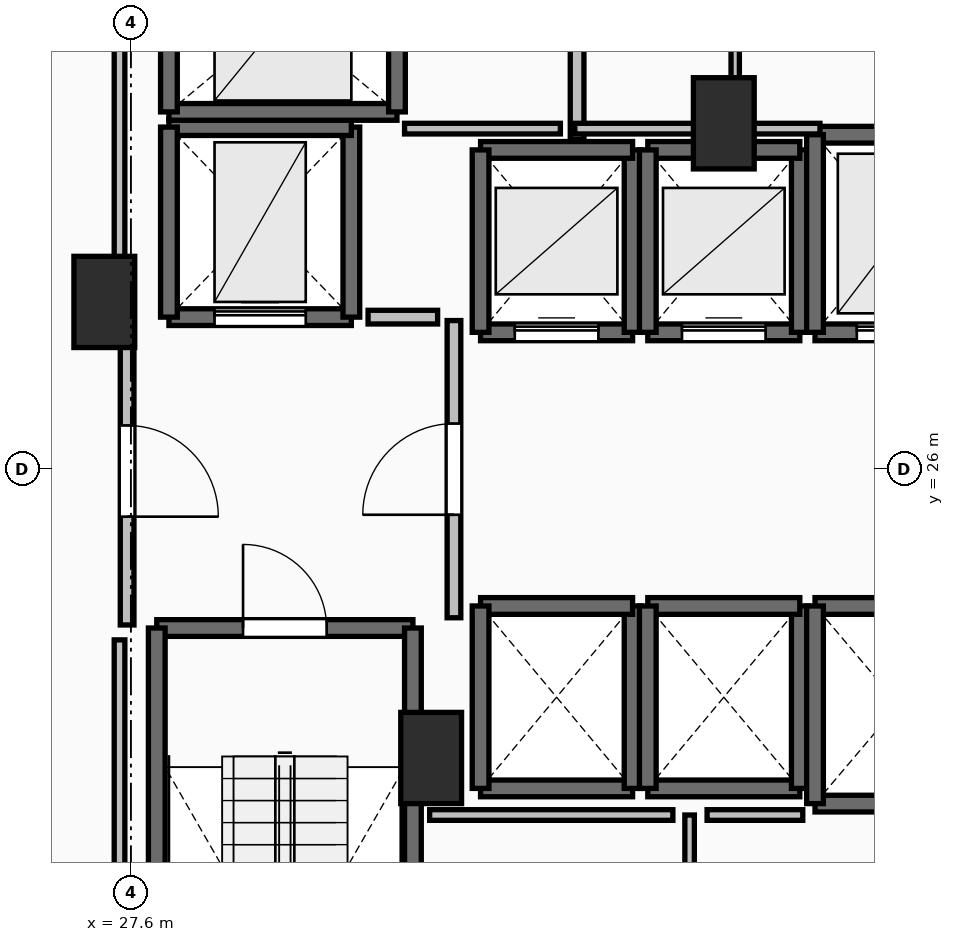
"""IFC4 building model, lengths in metres.
Left out: names, types, materials, properties, quantities, classifications, styles, units other than length and angle.
Written with IfcOpenShell. Run it as: python <this file> out.ifc"""

import sys

from ifc_helpers import new_model, si_unit, direction, frame, frame_2d, origin, origin_2d, place, context, subcontext, project, spatial, rectangle, extrude, element, fill, save


model = new_model("IFC4")
c1 = context("Model", 3, precision=1e-05, world=origin(), true_north=direction((0.0, 1.0)))
c2 = subcontext(c1, "Body", "Model", "MODEL_VIEW")
j1 = project(units=[si_unit("LENGTHUNIT", "METRE"), si_unit("PLANEANGLEUNIT", "RADIAN")], contexts=[c1])
p1 = place(None, origin())
s1 = spatial("IfcSite", under=j1, at=p1, CompositionType="ELEMENT")
p2 = place(p1, origin())
s2 = spatial("IfcBuilding", under=s1, at=p2, CompositionType="ELEMENT")
p3 = place(p2, frame((0.0, 0.0, 74.3)))
s3 = spatial("IfcBuildingStorey", under=s2, at=p3, CompositionType="ELEMENT", Elevation=74.3)
for number, where, z_axis, x_axis in (
    (1, (27.25, 28.2, 0.0), (0.0, 0.0, 1.0), (1.0, 0.0, 0.0)),
    (2, (31.55, 22.2, 0.0), (0.0, 0.0, 1.0), (1.0, 0.0, 0.0)),
    (3, (35.4, 30.55, 0.0), (0.0, 0.0, 1.0), (1.0, 0.0, 0.0)),
):
    element("IfcColumn", number, at=place(p3, frame(where, z_axis=z_axis, x_axis=x_axis)), inside=s3, PredefinedType="PILASTER", context=c2, shape_type="SweptSolid", body=[
        extrude(rectangle(XDim=0.8, YDim=1.2, at=origin_2d()), origin(), (0.0, 0.0, 1.0), 4.5),
    ])
p4 = place(p3, frame((27.94, 23.91, 0.0), z_axis=(0.0, 0.0, 1.0), x_axis=(1.0, 0.0, 0.0)))
e4 = element("IfcWall", 4, at=p4, inside=s3, PredefinedType="SOLIDWALL", context=c2, shape_type="SweptSolid", body=[
    extrude(rectangle(XDim=3.37, YDim=0.22, at=frame_2d((1.685, 0.0))), origin(), (0.0, 0.0, 1.0), 4.24),
])
p5 = place(p4, frame((1.135, 0.0, 0.0)))
e5 = element("IfcOpeningElement", 5, at=p5, cuts=e4, PredefinedType="OPENING", context=c2, shape_type="SweptSolid", body=[
    extrude(rectangle(XDim=1.1, YDim=2.15, at=frame_2d((0.55, 1.075))), frame((0.0, 0.125, 0.0), z_axis=(0.0, -1.0, 0.0), x_axis=(1.0, 0.0, 0.0)), (0.0, 0.0, 1.0), 0.25),
])
for number, where, z_axis, x_axis in (
    (6, (31.31, 23.91, 0.0), (0.0, 0.0, 1.0), (0.0, -1.0, 0.0)),
    (7, (27.94, 16.49, 0.0), (0.0, 0.0, 1.0), (0.0, 1.0, 0.0)),
):
    element("IfcWall", number, at=place(p3, frame(where, z_axis=z_axis, x_axis=x_axis)), inside=s3, PredefinedType="SOLIDWALL", context=c2, shape_type="SweptSolid", body=[
        extrude(rectangle(XDim=7.42, YDim=0.22, at=frame_2d((3.71, 0.0))), origin(), (0.0, 0.0, 1.0), 4.24),
    ])
p6 = place(p3, frame((32.2, 27.8, 0.0), z_axis=(0.0, 0.0, 1.0), x_axis=(1.0, 0.0, 0.0)))
e8 = element("IfcWall", 8, at=p6, inside=s3, PredefinedType="SOLIDWALL", context=c2, shape_type="SweptSolid", body=[
    extrude(rectangle(XDim=2.0, YDim=0.22, at=frame_2d((1.0, 0.0))), origin(), (0.0, 0.0, 1.0), 4.24),
])
p7 = place(p6, frame((0.45, 0.0, 0.0)))
e9 = element("IfcOpeningElement", 9, at=p7, cuts=e8, PredefinedType="OPENING", context=c2, shape_type="SweptSolid", body=[
    extrude(rectangle(XDim=1.1, YDim=2.2, at=frame_2d((0.55, 1.1))), frame((0.0, 0.125, 0.0), z_axis=(0.0, -1.0, 0.0), x_axis=(1.0, 0.0, 0.0)), (0.0, 0.0, 1.0), 0.25),
])
p8 = place(p3, frame((34.2, 27.8, 0.0), z_axis=(0.0, 0.0, 1.0), x_axis=(0.0, 1.0, 0.0)))
e10 = element("IfcWall", 10, at=p8, inside=s3, PredefinedType="SOLIDWALL", context=c2, shape_type="SweptSolid", body=[
    extrude(rectangle(XDim=2.4, YDim=0.22, at=frame_2d((1.2, 0.0))), origin(), (0.0, 0.0, 1.0), 4.24),
])
p9 = place(p3, frame((34.2, 30.2, 0.0), z_axis=(0.0, 0.0, 1.0), x_axis=(-1.0, 0.0, 0.0)))
e11 = element("IfcWall", 11, at=p9, inside=s3, PredefinedType="SOLIDWALL", context=c2, shape_type="SweptSolid", body=[
    extrude(rectangle(XDim=2.0, YDim=0.22, at=frame_2d((1.0, 0.0))), origin(), (0.0, 0.0, 1.0), 4.24),
])
p10 = place(p3, frame((32.2, 30.2, 0.0), z_axis=(0.0, 0.0, 1.0), x_axis=(0.0, -1.0, 0.0)))
e12 = element("IfcWall", 12, at=p10, inside=s3, PredefinedType="SOLIDWALL", context=c2, shape_type="SweptSolid", body=[
    extrude(rectangle(XDim=2.4, YDim=0.22, at=frame_2d((1.2, 0.0))), origin(), (0.0, 0.0, 1.0), 4.24),
])
p11 = place(p3, frame((34.4, 27.8, 0.0), z_axis=(0.0, 0.0, 1.0), x_axis=(1.0, 0.0, 0.0)))
e13 = element("IfcWall", 13, at=p11, inside=s3, PredefinedType="SOLIDWALL", context=c2, shape_type="SweptSolid", body=[
    extrude(rectangle(XDim=2.0, YDim=0.22, at=frame_2d((1.0, 0.0))), origin(), (0.0, 0.0, 1.0), 4.24),
])
p12 = place(p11, frame((0.45, 0.0, 0.0)))
e14 = element("IfcOpeningElement", 14, at=p12, cuts=e13, PredefinedType="OPENING", context=c2, shape_type="SweptSolid", body=[
    extrude(rectangle(XDim=1.1, YDim=2.2, at=frame_2d((0.55, 1.1))), frame((0.0, 0.125, 0.0), z_axis=(0.0, -1.0, 0.0), x_axis=(1.0, 0.0, 0.0)), (0.0, 0.0, 1.0), 0.25),
])
p13 = place(p3, frame((36.4, 27.8, 0.0), z_axis=(0.0, 0.0, 1.0), x_axis=(0.0, 1.0, 0.0)))
e15 = element("IfcWall", 15, at=p13, inside=s3, PredefinedType="SOLIDWALL", context=c2, shape_type="SweptSolid", body=[
    extrude(rectangle(XDim=2.4, YDim=0.22, at=frame_2d((1.2, 0.0))), origin(), (0.0, 0.0, 1.0), 4.24),
])
p14 = place(p3, frame((36.4, 30.2, 0.0), z_axis=(0.0, 0.0, 1.0), x_axis=(-1.0, 0.0, 0.0)))
e16 = element("IfcWall", 16, at=p14, inside=s3, PredefinedType="SOLIDWALL", context=c2, shape_type="SweptSolid", body=[
    extrude(rectangle(XDim=2.0, YDim=0.22, at=frame_2d((1.0, 0.0))), origin(), (0.0, 0.0, 1.0), 4.24),
])
p15 = place(p3, frame((34.4, 30.2, 0.0), z_axis=(0.0, 0.0, 1.0), x_axis=(0.0, -1.0, 0.0)))
e17 = element("IfcWall", 17, at=p15, inside=s3, PredefinedType="SOLIDWALL", context=c2, shape_type="SweptSolid", body=[
    extrude(rectangle(XDim=2.4, YDim=0.22, at=frame_2d((1.2, 0.0))), origin(), (0.0, 0.0, 1.0), 4.24),
])
p16 = place(p3, frame((36.6, 27.8, 0.0), z_axis=(0.0, 0.0, 1.0), x_axis=(1.0, 0.0, 0.0)))
e18 = element("IfcWall", 18, at=p16, inside=s3, PredefinedType="SOLIDWALL", context=c2, shape_type="SweptSolid", body=[
    extrude(rectangle(XDim=2.2, YDim=0.22, at=frame_2d((1.1, 0.0))), origin(), (0.0, 0.0, 1.0), 4.24),
])
p17 = place(p16, frame((0.55, 0.0, 0.0)))
e19 = element("IfcOpeningElement", 19, at=p17, cuts=e18, PredefinedType="OPENING", context=c2, shape_type="SweptSolid", body=[
    extrude(rectangle(XDim=1.1, YDim=2.2, at=frame_2d((0.55, 1.1))), frame((0.0, 0.125, 0.0), z_axis=(0.0, -1.0, 0.0), x_axis=(1.0, 0.0, 0.0)), (0.0, 0.0, 1.0), 0.25),
])
p18 = place(p3, frame((38.8, 30.4, 0.0), z_axis=(0.0, 0.0, 1.0), x_axis=(-1.0, 0.0, 0.0)))
e20 = element("IfcWall", 20, at=p18, inside=s3, PredefinedType="SOLIDWALL", context=c2, shape_type="SweptSolid", body=[
    extrude(rectangle(XDim=2.2, YDim=0.22, at=frame_2d((1.1, 0.0))), origin(), (0.0, 0.0, 1.0), 4.24),
])
p19 = place(p3, frame((36.6, 30.4, 0.0), z_axis=(0.0, 0.0, 1.0), x_axis=(0.0, -1.0, 0.0)))
e21 = element("IfcWall", 21, at=p19, inside=s3, PredefinedType="SOLIDWALL", context=c2, shape_type="SweptSolid", body=[
    extrude(rectangle(XDim=2.6, YDim=0.22, at=frame_2d((1.3, 0.0))), origin(), (0.0, 0.0, 1.0), 4.24),
])
p20 = place(p3, frame((32.2, 21.8, 0.0), z_axis=(0.0, 0.0, 1.0), x_axis=(1.0, 0.0, 0.0)))
e22 = element("IfcWall", 22, at=p20, inside=s3, PredefinedType="SOLIDWALL", context=c2, shape_type="SweptSolid", body=[
    extrude(rectangle(XDim=2.0, YDim=0.22, at=frame_2d((1.0, 0.0))), origin(), (0.0, 0.0, 1.0), 4.24),
])
p21 = place(p3, frame((34.2, 21.8, 0.0), z_axis=(0.0, 0.0, 1.0), x_axis=(0.0, 1.0, 0.0)))
e23 = element("IfcWall", 23, at=p21, inside=s3, PredefinedType="SOLIDWALL", context=c2, shape_type="SweptSolid", body=[
    extrude(rectangle(XDim=2.4, YDim=0.22, at=frame_2d((1.2, 0.0))), origin(), (0.0, 0.0, 1.0), 4.24),
])
p22 = place(p3, frame((34.2, 24.2, 0.0), z_axis=(0.0, 0.0, 1.0), x_axis=(-1.0, 0.0, 0.0)))
e24 = element("IfcWall", 24, at=p22, inside=s3, PredefinedType="SOLIDWALL", context=c2, shape_type="SweptSolid", body=[
    extrude(rectangle(XDim=2.0, YDim=0.22, at=frame_2d((1.0, 0.0))), origin(), (0.0, 0.0, 1.0), 4.24),
])
p23 = place(p3, frame((32.2, 24.2, 0.0), z_axis=(0.0, 0.0, 1.0), x_axis=(0.0, -1.0, 0.0)))
e25 = element("IfcWall", 25, at=p23, inside=s3, PredefinedType="SOLIDWALL", context=c2, shape_type="SweptSolid", body=[
    extrude(rectangle(XDim=2.4, YDim=0.22, at=frame_2d((1.2, 0.0))), origin(), (0.0, 0.0, 1.0), 4.24),
])
p24 = place(p3, frame((34.4, 21.8, 0.0), z_axis=(0.0, 0.0, 1.0), x_axis=(1.0, 0.0, 0.0)))
e26 = element("IfcWall", 26, at=p24, inside=s3, PredefinedType="SOLIDWALL", context=c2, shape_type="SweptSolid", body=[
    extrude(rectangle(XDim=2.0, YDim=0.22, at=frame_2d((1.0, 0.0))), origin(), (0.0, 0.0, 1.0), 4.24),
])
p25 = place(p3, frame((36.4, 21.8, 0.0), z_axis=(0.0, 0.0, 1.0), x_axis=(0.0, 1.0, 0.0)))
e27 = element("IfcWall", 27, at=p25, inside=s3, PredefinedType="SOLIDWALL", context=c2, shape_type="SweptSolid", body=[
    extrude(rectangle(XDim=2.4, YDim=0.22, at=frame_2d((1.2, 0.0))), origin(), (0.0, 0.0, 1.0), 4.24),
])
p26 = place(p3, frame((36.4, 24.2, 0.0), z_axis=(0.0, 0.0, 1.0), x_axis=(-1.0, 0.0, 0.0)))
e28 = element("IfcWall", 28, at=p26, inside=s3, PredefinedType="SOLIDWALL", context=c2, shape_type="SweptSolid", body=[
    extrude(rectangle(XDim=2.0, YDim=0.22, at=frame_2d((1.0, 0.0))), origin(), (0.0, 0.0, 1.0), 4.24),
])
p27 = place(p3, frame((34.4, 24.2, 0.0), z_axis=(0.0, 0.0, 1.0), x_axis=(0.0, -1.0, 0.0)))
e29 = element("IfcWall", 29, at=p27, inside=s3, PredefinedType="SOLIDWALL", context=c2, shape_type="SweptSolid", body=[
    extrude(rectangle(XDim=2.4, YDim=0.22, at=frame_2d((1.2, 0.0))), origin(), (0.0, 0.0, 1.0), 4.24),
])
for number, where, z_axis, x_axis in (
    (30, (36.6, 21.6, 0.0), (0.0, 0.0, 1.0), (1.0, 0.0, 0.0)),
    (31, (38.8, 24.2, 0.0), (0.0, 0.0, 1.0), (-1.0, 0.0, 0.0)),
):
    element("IfcWall", number, at=place(p3, frame(where, z_axis=z_axis, x_axis=x_axis)), inside=s3, PredefinedType="SOLIDWALL", context=c2, shape_type="SweptSolid", body=[
        extrude(rectangle(XDim=2.2, YDim=0.22, at=frame_2d((1.1, 0.0))), origin(), (0.0, 0.0, 1.0), 4.24),
    ])
p28 = place(p3, frame((36.6, 24.2, 0.0), z_axis=(0.0, 0.0, 1.0), x_axis=(0.0, -1.0, 0.0)))
e32 = element("IfcWall", 32, at=p28, inside=s3, PredefinedType="SOLIDWALL", context=c2, shape_type="SweptSolid", body=[
    extrude(rectangle(XDim=2.6, YDim=0.22, at=frame_2d((1.3, 0.0))), origin(), (0.0, 0.0, 1.0), 4.24),
])
p29 = place(p3, frame((28.1, 28.0, 0.0), z_axis=(0.0, 0.0, 1.0), x_axis=(1.0, 0.0, 0.0)))
e33 = element("IfcWall", 33, at=p29, inside=s3, PredefinedType="SHEAR", context=c2, shape_type="SweptSolid", body=[
    extrude(rectangle(XDim=2.4, YDim=0.22, at=frame_2d((1.2, 0.0))), origin(), (0.0, 0.0, 1.0), 4.24),
])
p30 = place(p29, frame((0.6, 0.0, 0.0)))
e34 = element("IfcOpeningElement", 34, at=p30, cuts=e33, PredefinedType="OPENING", context=c2, shape_type="SweptSolid", body=[
    extrude(rectangle(XDim=1.2, YDim=2.2, at=frame_2d((0.6, 1.1))), frame((0.0, 0.125, 0.0), z_axis=(0.0, -1.0, 0.0), x_axis=(1.0, 0.0, 0.0)), (0.0, 0.0, 1.0), 0.25),
])
p31 = place(p3, frame((30.5, 28.0, 0.0), z_axis=(0.0, 0.0, 1.0), x_axis=(0.0, 1.0, 0.0)))
e35 = element("IfcWall", 35, at=p31, inside=s3, PredefinedType="SHEAR", context=c2, shape_type="SweptSolid", body=[
    extrude(rectangle(XDim=2.5, YDim=0.22, at=frame_2d((1.25, 0.0))), origin(), (0.0, 0.0, 1.0), 4.24),
])
p32 = place(p3, frame((30.5, 30.5, 0.0), z_axis=(0.0, 0.0, 1.0), x_axis=(-1.0, 0.0, 0.0)))
e36 = element("IfcWall", 36, at=p32, inside=s3, PredefinedType="SHEAR", context=c2, shape_type="SweptSolid", body=[
    extrude(rectangle(XDim=2.4, YDim=0.22, at=frame_2d((1.2, 0.0))), origin(), (0.0, 0.0, 1.0), 4.24),
])
p33 = place(p3, frame((28.1, 30.5, 0.0), z_axis=(0.0, 0.0, 1.0), x_axis=(0.0, -1.0, 0.0)))
e37 = element("IfcWall", 37, at=p33, inside=s3, PredefinedType="SHEAR", context=c2, shape_type="SweptSolid", body=[
    extrude(rectangle(XDim=2.5, YDim=0.22, at=frame_2d((1.25, 0.0))), origin(), (0.0, 0.0, 1.0), 4.24),
])
p34 = place(p3, frame((28.1, 30.7, 0.0), z_axis=(0.0, 0.0, 1.0), x_axis=(1.0, 0.0, 0.0)))
e38 = element("IfcWall", 38, at=p34, inside=s3, PredefinedType="SOLIDWALL", context=c2, shape_type="SweptSolid", body=[
    extrude(rectangle(XDim=3.0, YDim=0.22, at=frame_2d((1.5, 0.0))), origin(), (0.0, 0.0, 1.0), 4.24),
])
for number, where, z_axis, x_axis in (
    (39, (31.1, 30.7, 0.0), (0.0, 0.0, 1.0), (0.0, 1.0, 0.0)),
    (40, (28.1, 33.2, 0.0), (0.0, 0.0, 1.0), (0.0, -1.0, 0.0)),
):
    element("IfcWall", number, at=place(p3, frame(where, z_axis=z_axis, x_axis=x_axis)), inside=s3, PredefinedType="SOLIDWALL", context=c2, shape_type="SweptSolid", body=[
        extrude(rectangle(XDim=2.5, YDim=0.22, at=frame_2d((1.25, 0.0))), origin(), (0.0, 0.0, 1.0), 4.24),
    ])
p35 = place(p3, frame((31.85, 24.045, 0.0), z_axis=(0.0, 0.0, 1.0), x_axis=(0.0, 1.0, 0.0)))
e41 = element("IfcWall", 41, at=p35, inside=s3, PredefinedType="PARTITIONING", context=c2, shape_type="SweptSolid", body=[
    extrude(rectangle(XDim=3.91, YDim=0.18, at=frame_2d((1.955, 0.0))), origin(), (0.0, 0.0, 1.0), 4.24),
])
p36 = place(p35, frame((1.355, 0.0, 0.0)))
e42 = element("IfcOpeningElement", 42, at=p36, cuts=e41, PredefinedType="OPENING", context=c2, shape_type="SweptSolid", body=[
    extrude(rectangle(XDim=1.2, YDim=2.15, at=frame_2d((0.6, 1.075))), frame((0.0, 0.105, 0.0), z_axis=(0.0, -1.0, 0.0), x_axis=(1.0, 0.0, 0.0)), (0.0, 0.0, 1.0), 0.21),
])
p37 = place(p3, frame((27.55, 28.0, 0.0), z_axis=(0.0, 0.0, 1.0), x_axis=(0.0, -1.0, 0.0)))
e43 = element("IfcWall", 43, at=p37, inside=s3, PredefinedType="PARTITIONING", context=c2, shape_type="SweptSolid", body=[
    extrude(rectangle(XDim=4.05, YDim=0.18, at=frame_2d((2.025, 0.0))), origin(), (0.0, 0.0, 1.0), 4.24),
])
p38 = place(p37, frame((1.425, 0.0, 0.0)))
e44 = element("IfcOpeningElement", 44, at=p38, cuts=e43, PredefinedType="OPENING", context=c2, shape_type="SweptSolid", body=[
    extrude(rectangle(XDim=1.2, YDim=2.15, at=frame_2d((0.6, 1.075))), frame((0.0, 0.105, 0.0), z_axis=(0.0, -1.0, 0.0), x_axis=(1.0, 0.0, 0.0)), (0.0, 0.0, 1.0), 0.21),
])
p39 = place(p3, frame((33.47, 30.34, 0.0), z_axis=(0.0, 0.0, 1.0), x_axis=(0.0, 1.0, 0.0)))
e45 = element("IfcWall", 45, at=p39, inside=s3, PredefinedType="PARTITIONING", context=c2, shape_type="SweptSolid", body=[
    extrude(rectangle(XDim=3.56, YDim=0.18, at=frame_2d((1.78, 0.0))), origin(), (0.0, 0.0, 1.0), 4.24),
])
p40 = place(p3, frame((35.55, 30.34, 0.0), z_axis=(0.0, 0.0, 1.0), x_axis=(0.0, 1.0, 0.0)))
e46 = element("IfcWall", 46, at=p40, inside=s3, PredefinedType="PARTITIONING", context=c2, shape_type="SweptSolid", body=[
    extrude(rectangle(XDim=3.56, YDim=0.11, at=frame_2d((1.78, 0.0))), origin(), (0.0, 0.0, 1.0), 3.432),
])
p41 = place(p3, frame((34.95, 16.32, 0.0), z_axis=(0.0, 0.0, 1.0), x_axis=(0.0, 1.0, 0.0)))
e47 = element("IfcWall", 47, at=p41, inside=s3, PredefinedType="PARTITIONING", context=c2, shape_type="SweptSolid", body=[
    extrude(rectangle(XDim=5.13, YDim=0.125, at=frame_2d((2.565, 0.0))), origin(), (0.0, 0.0, 1.0), 4.24),
])
p42 = place(p3, frame((31.635, 28.0, 0.0), z_axis=(0.0, 0.0, 1.0), x_axis=(-1.0, 0.0, 0.0)))
e48 = element("IfcWall", 48, at=p42, inside=s3, PredefinedType="PARTITIONING", context=c2, shape_type="SweptSolid", body=[
    extrude(rectangle(XDim=0.915, YDim=0.18, at=frame_2d((0.458, 0.0))), origin(), (0.0, 0.0, 1.0), 4.24),
])
p43 = place(p3, frame((31.2, 30.48, 0.0), z_axis=(0.0, 0.0, 1.0), x_axis=(1.0, 0.0, 0.0)))
e49 = element("IfcWall", 49, at=p43, inside=s3, PredefinedType="PARTITIONING", context=c2, shape_type="SweptSolid", body=[
    extrude(rectangle(XDim=2.05, YDim=0.14, at=frame_2d((1.025, 0.0))), origin(), (0.0, 0.0, 1.0), 4.24),
])
p44 = place(p3, frame((33.44, 30.48, 0.0), z_axis=(0.0, 0.0, 1.0), x_axis=(1.0, 0.0, 0.0)))
e50 = element("IfcWall", 50, at=p44, inside=s3, PredefinedType="PARTITIONING", context=c2, shape_type="SweptSolid", body=[
    extrude(rectangle(XDim=2.14, YDim=0.14, at=frame_2d((1.07, 0.0))), origin(), (0.0, 0.0, 1.0), 3.432),
])
p45 = place(p3, frame((35.6, 30.48, 0.0), z_axis=(0.0, 0.0, 1.0), x_axis=(1.0, 0.0, 0.0)))
e51 = element("IfcWall", 51, at=p45, inside=s3, PredefinedType="PARTITIONING", context=c2, shape_type="SweptSolid", body=[
    extrude(rectangle(XDim=1.065, YDim=0.14, at=frame_2d((0.532, 0.0))), origin(), (0.0, 0.0, 1.0), 3.432),
])
p46 = place(p3, frame((34.73, 21.45, 0.0), z_axis=(0.0, 0.0, 1.0), x_axis=(-1.0, 0.0, 0.0)))
e52 = element("IfcWall", 52, at=p46, inside=s3, PredefinedType="PARTITIONING", context=c2, shape_type="SweptSolid", body=[
    extrude(rectangle(XDim=3.2, YDim=0.14, at=frame_2d((1.6, 0.0))), origin(), (0.0, 0.0, 1.0), 4.24),
])
p47 = place(p3, frame((36.439, 21.45, 0.0), z_axis=(0.0, 0.0, 1.0), x_axis=(-1.0, 0.0, 0.0)))
e53 = element("IfcWall", 53, at=p47, inside=s3, PredefinedType="PARTITIONING", context=c2, shape_type="SweptSolid", body=[
    extrude(rectangle(XDim=1.259, YDim=0.14, at=frame_2d((0.629, 0.0))), origin(), (0.0, 0.0, 1.0), 4.24),
])
p48 = place(p3, frame((27.45, 16.24, 0.0), z_axis=(0.0, 0.0, 1.0), x_axis=(0.0, 1.0, 0.0)))
e54 = element("IfcWall", 54, at=p48, inside=s3, PredefinedType="PARTITIONING", context=c2, shape_type="SweptSolid", body=[
    extrude(rectangle(XDim=7.514, YDim=0.14, at=frame_2d((3.757, 0.0))), origin(), (0.0, 0.0, 1.0), 3.432),
])
p49 = place(p3, frame((27.45, 28.196, 0.0), z_axis=(0.0, 0.0, 1.0), x_axis=(0.0, 1.0, 0.0)))
e55 = element("IfcWall", 55, at=p49, inside=s3, PredefinedType="PARTITIONING", context=c2, shape_type="SweptSolid", body=[
    extrude(rectangle(XDim=5.254, YDim=0.14, at=frame_2d((2.627, 0.0))), origin(), (0.0, 0.0, 1.0), 3.432),
])
p50 = place(p5, origin())
e56 = element("IfcDoor", 56, at=p50, inside=s3, OperationType="SINGLE_SWING_LEFT", PredefinedType="DOOR", context=c2, shape_type="SweptSolid", body=[
    extrude(rectangle(XDim=1.1, YDim=2.15, at=frame_2d((0.55, 1.075))), frame((0.0, 0.025, 0.0), z_axis=(0.0, -1.0, 0.0), x_axis=(1.0, 0.0, 0.0)), (0.0, 0.0, 1.0), 0.05),
])
fill(e5, e56)
p51 = place(p7, origin())
e57 = element("IfcDoor", 57, at=p51, inside=s3, OperationType="SLIDING_TO_LEFT", PredefinedType="DOOR", context=c2, shape_type="SweptSolid", body=[
    extrude(rectangle(XDim=1.1, YDim=2.2, at=frame_2d((0.55, 1.1))), frame((0.0, 0.025, 0.0), z_axis=(0.0, -1.0, 0.0), x_axis=(1.0, 0.0, 0.0)), (0.0, 0.0, 1.0), 0.05),
])
fill(e9, e57)
p52 = place(p12, origin())
e58 = element("IfcDoor", 58, at=p52, inside=s3, OperationType="SLIDING_TO_LEFT", PredefinedType="DOOR", context=c2, shape_type="SweptSolid", body=[
    extrude(rectangle(XDim=1.1, YDim=2.2, at=frame_2d((0.55, 1.1))), frame((0.0, 0.025, 0.0), z_axis=(0.0, -1.0, 0.0), x_axis=(1.0, 0.0, 0.0)), (0.0, 0.0, 1.0), 0.05),
])
fill(e14, e58)
p53 = place(p17, origin())
e59 = element("IfcDoor", 59, at=p53, inside=s3, OperationType="SLIDING_TO_LEFT", PredefinedType="DOOR", context=c2, shape_type="SweptSolid", body=[
    extrude(rectangle(XDim=1.1, YDim=2.2, at=frame_2d((0.55, 1.1))), frame((0.0, 0.025, 0.0), z_axis=(0.0, -1.0, 0.0), x_axis=(1.0, 0.0, 0.0)), (0.0, 0.0, 1.0), 0.05),
])
fill(e19, e59)
p54 = place(p30, origin())
e60 = element("IfcDoor", 60, at=p54, inside=s3, OperationType="SLIDING_TO_LEFT", PredefinedType="DOOR", context=c2, shape_type="SweptSolid", body=[
    extrude(rectangle(XDim=1.2, YDim=2.2, at=frame_2d((0.6, 1.1))), frame((0.0, 0.025, 0.0), z_axis=(0.0, -1.0, 0.0), x_axis=(1.0, 0.0, 0.0)), (0.0, 0.0, 1.0), 0.05),
])
fill(e34, e60)
p55 = place(p36, origin())
e61 = element("IfcDoor", 61, at=p55, inside=s3, OperationType="SINGLE_SWING_LEFT", PredefinedType="DOOR", context=c2, shape_type="SweptSolid", body=[
    extrude(rectangle(XDim=1.2, YDim=2.15, at=frame_2d((0.6, 1.075))), frame((0.0, 0.025, 0.0), z_axis=(0.0, -1.0, 0.0), x_axis=(1.0, 0.0, 0.0)), (0.0, 0.0, 1.0), 0.05),
])
fill(e42, e61)
p56 = place(p38, origin())
e62 = element("IfcDoor", 62, at=p56, inside=s3, OperationType="SINGLE_SWING_RIGHT", PredefinedType="DOOR", context=c2, shape_type="SweptSolid", body=[
    extrude(rectangle(XDim=1.2, YDim=2.15, at=frame_2d((0.6, 1.075))), frame((0.0, 0.025, 0.0), z_axis=(0.0, -1.0, 0.0), x_axis=(1.0, 0.0, 0.0)), (0.0, 0.0, 1.0), 0.05),
])
fill(e44, e62)
save(model, sys.argv[1])
